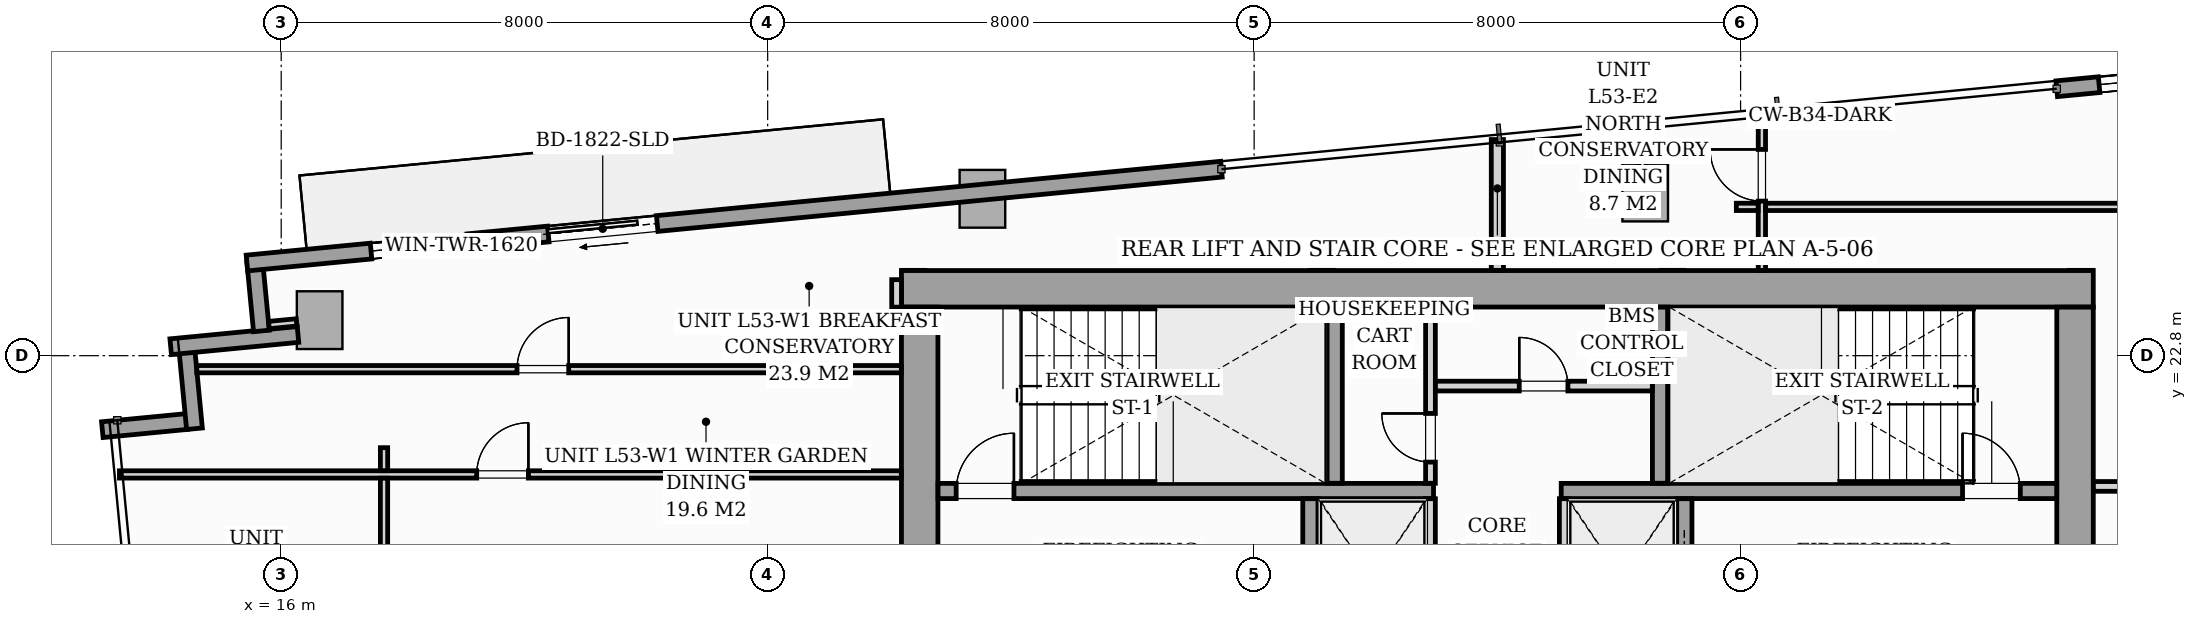
"""IFC4 building model, lengths in metres.
Left out: names, types, materials, properties, quantities, classifications, styles, units other than length and angle.
Written with IfcOpenShell. Run it as: python <this file> out.ifc"""

import sys

from ifc_helpers import new_model, si_unit, direction, frame, frame_2d, origin, origin_2d, place, context, subcontext, project, spatial, rectangle, i_section, extrude, source, transform, mapped, element, fill, save


model = new_model("IFC4")
c1 = context("Model", 3, precision=1e-05, world=origin(), true_north=direction((0.0, 1.0)))
c2 = subcontext(c1, "Body", "Model", "MODEL_VIEW")
j1 = project(units=[si_unit("LENGTHUNIT", "METRE"), si_unit("PLANEANGLEUNIT", "RADIAN")], contexts=[c1])
p1 = place(None, origin())
s1 = spatial("IfcSite", under=j1, at=p1, CompositionType="ELEMENT")
p2 = place(p1, origin())
s2 = spatial("IfcBuilding", under=s1, at=p2, CompositionType="ELEMENT")
p3 = place(p2, frame((0.0, 0.0, 185.8)))
s3 = spatial("IfcBuildingStorey", under=s2, at=p3, CompositionType="ELEMENT", Elevation=185.8)
m1 = source(origin(), c2, "Body", "SweptSolid", [
    extrude(i_section(OverallWidth=0.416, OverallDepth=0.446, WebThickness=0.039, FlangeThickness=0.063, FilletRadius=0.018, at=origin_2d()), origin(), (0.0, 0.0, 1.0), 3.196),
])
for number, where, z_axis, x_axis in (
    (1, (26.4, 24.0, 0.002), (0.0, 0.0, 1.0), (1.0, 0.0, 0.0)),
    (2, (33.12, 24.0, 0.002), (0.0, 0.0, 1.0), (1.0, 0.0, 0.0)),
    (3, (38.88, 24.0, 0.002), (0.0, 0.0, 1.0), (1.0, 0.0, 0.0)),
    (4, (45.6, 24.0, 0.002), (0.0, 0.0, 1.0), (1.0, 0.0, 0.0)),
):
    element("IfcColumn", number, at=place(p3, frame(where, z_axis=z_axis, x_axis=x_axis)), inside=s3, PredefinedType="PILASTER", context=c2, shape_type="MappedRepresentation", body=[
        mapped(m1, transform((0.0, 0.0, 0.0), scale=1.0)),
    ])
m2 = source(origin(), c2, "Body", "SweptSolid", [
    extrude(rectangle(XDim=0.75, YDim=0.95, at=origin_2d()), origin(), (0.0, 0.0, 1.0), 3.196),
])
for number, where, z_axis, x_axis in (
    (5, (16.632, 23.384, 0.002), (0.0, 0.0, 1.0), (0.995, 0.096, 0.0)),
    (6, (27.532, 25.38, 0.002), (0.0, 0.0, 1.0), (0.995, 0.096, 0.0)),
    (7, (38.431, 25.483, 0.002), (0.0, 0.0, 1.0), (0.995, 0.096, 0.0)),
):
    element("IfcColumn", number, at=place(p3, frame(where, z_axis=z_axis, x_axis=x_axis)), inside=s3, PredefinedType="COLUMN", context=c2, shape_type="MappedRepresentation", body=[
        mapped(m2, transform((0.0, 0.0, 0.0), scale=1.0)),
    ])
p4 = place(p3, frame((13.058, 21.583, 0.0), z_axis=(0.0, 0.0, 1.0), x_axis=(0.99540774648, 0.095725744959, 0.0)))
e8 = element("IfcWall", 8, at=p4, inside=s3, PredefinedType="STANDARD", context=c2, shape_type="SweptSolid", body=[
    extrude(rectangle(XDim=1.395, YDim=0.26, at=frame_2d((0.698, 0.0))), origin(), (0.0, 0.0, 1.0), 2.94),
])
p5 = place(p3, frame((14.574, 21.599, 0.0), z_axis=(0.0, 0.0, 1.0), x_axis=(-0.095742423056, 0.99540614245, 0.0)))
e9 = element("IfcWall", 9, at=p5, inside=s3, PredefinedType="STANDARD", context=c2, shape_type="SweptSolid", body=[
    extrude(rectangle(XDim=1.395, YDim=0.26, at=frame_2d((0.697, 0.0))), origin(), (0.0, 0.0, 1.0), 2.94),
])
p6 = place(p3, frame((14.183, 22.947, 0.0), z_axis=(0.0, 0.0, 1.0), x_axis=(0.995401580483, 0.095789840651, 0.0)))
e10 = element("IfcWall", 10, at=p6, inside=s3, PredefinedType="STANDARD", context=c2, shape_type="SweptSolid", body=[
    extrude(rectangle(XDim=2.103, YDim=0.26, at=frame_2d((1.051, 0.0))), origin(), (0.0, 0.0, 1.0), 2.94),
])
p7 = place(p3, frame((15.675, 23.207, 0.0), z_axis=(0.0, 0.0, 1.0), x_axis=(-0.095951054827, 0.995386053287, 0.0)))
e11 = element("IfcWall", 11, at=p7, inside=s3, PredefinedType="STANDARD", context=c2, shape_type="SweptSolid", body=[
    extrude(rectangle(XDim=1.15, YDim=0.26, at=frame_2d((0.575, 0.0))), origin(), (0.0, 0.0, 1.0), 2.94),
])
p8 = place(p3, frame((15.437, 24.324, 0.0), z_axis=(0.0, 0.0, 1.0), x_axis=(0.995395627913, 0.095851676732, 0.0)))
e12 = element("IfcWall", 12, at=p8, inside=s3, PredefinedType="STANDARD", context=c2, shape_type="SweptSolid", body=[
    extrude(rectangle(XDim=16.1, YDim=0.26, at=frame_2d((8.05, 0.0))), origin(), (0.0, 0.0, 1.0), 2.94),
])
p9 = place(p8, frame((4.978, 0.0, 0.0)))
e13 = element("IfcOpeningElement", 13, at=p9, cuts=e12, PredefinedType="OPENING", context=c2, shape_type="SweptSolid", body=[
    extrude(rectangle(XDim=1.8, YDim=2.06, at=frame_2d((0.9, 1.03))), frame((0.0, 0.14, 0.0), z_axis=(0.0, -1.0, 0.0), x_axis=(1.0, 0.0, 0.0)), (0.0, 0.0, 1.0), 0.28),
])
p10 = place(p8, frame((2.05, 0.0, 0.65)))
e14 = element("IfcOpeningElement", 14, at=p10, cuts=e12, PredefinedType="OPENING", context=c2, shape_type="SweptSolid", body=[
    extrude(rectangle(XDim=1.6, YDim=1.5, at=frame_2d((0.8, 0.75))), frame((0.0, 0.14, 0.0), z_axis=(0.0, -1.0, 0.0), x_axis=(1.0, 0.0, 0.0)), (0.0, 0.0, 1.0), 0.28),
])
p11 = place(p3, frame((45.199, 27.19, 0.0), z_axis=(0.0, 0.0, 1.0), x_axis=(0.995397074604, 0.095836652014, 0.0)))
e15 = element("IfcWall", 15, at=p11, inside=s3, PredefinedType="STANDARD", context=c2, shape_type="SweptSolid", body=[
    extrude(rectangle(XDim=16.1, YDim=0.26, at=frame_2d((8.05, 0.0))), origin(), (0.0, 0.0, 1.0), 2.94),
])
p12 = place(p11, frame((8.19, 0.0, 0.0)))
e16 = element("IfcOpeningElement", 16, at=p12, cuts=e15, PredefinedType="OPENING", context=c2, shape_type="SweptSolid", body=[
    extrude(rectangle(XDim=1.8, YDim=2.06, at=frame_2d((0.9, 1.03))), frame((0.0, 0.14, 0.0), z_axis=(0.0, -1.0, 0.0), x_axis=(1.0, 0.0, 0.0)), (0.0, 0.0, 1.0), 0.28),
])
p13 = place(p11, frame((0.7, 0.0, 0.65)))
e17 = element("IfcOpeningElement", 17, at=p13, cuts=e15, PredefinedType="OPENING", context=c2, shape_type="SweptSolid", body=[
    extrude(rectangle(XDim=1.6, YDim=1.5, at=frame_2d((0.8, 0.75))), frame((0.0, 0.14, 0.0), z_axis=(0.0, -1.0, 0.0), x_axis=(1.0, 0.0, 0.0)), (0.0, 0.0, 1.0), 0.28),
])
p14 = place(p3, frame((26.2, 23.9, 0.0), z_axis=(0.0, 0.0, 1.0), x_axis=(1.0, 0.0, 0.0)))
e18 = element("IfcWall", 18, at=p14, inside=s3, PredefinedType="SHEAR", context=c2, shape_type="SweptSolid", body=[
    extrude(rectangle(XDim=19.6, YDim=0.6, at=frame_2d((9.8, 0.0))), origin(), (0.0, 0.0, 1.0), 3.2),
])
for number, where, z_axis, x_axis in (
    (19, (26.5, 17.802, 0.0), (0.0, 0.0, 1.0), (0.0, 1.0, 0.0)),
    (20, (45.5, 17.802, 0.0), (0.0, 0.0, 1.0), (0.0, 1.0, 0.0)),
):
    element("IfcWall", number, at=place(p3, frame(where, z_axis=z_axis, x_axis=x_axis)), inside=s3, PredefinedType="SHEAR", context=c2, shape_type="SweptSolid", body=[
        extrude(rectangle(XDim=5.796, YDim=0.6, at=frame_2d((2.898, 0.0))), origin(), (0.0, 0.0, 1.0), 3.2),
    ])
p15 = place(p3, frame((26.802, 20.575, 0.0), z_axis=(0.0, 0.0, 1.0), x_axis=(1.0, 0.0, 0.0)))
e21 = element("IfcWall", 21, at=p15, inside=s3, PredefinedType="SOLIDWALL", context=c2, shape_type="SweptSolid", body=[
    extrude(rectangle(XDim=8.148, YDim=0.25, at=frame_2d((4.074, 0.0))), origin(), (0.0, 0.0, 1.0), 3.2),
])
p16 = place(p15, frame((0.298, 0.0, 0.0)))
e22 = element("IfcOpeningElement", 22, at=p16, cuts=e21, PredefinedType="OPENING", context=c2, shape_type="SweptSolid", body=[
    extrude(rectangle(XDim=0.95, YDim=2.06, at=frame_2d((0.475, 1.03))), frame((0.0, 0.135, 0.0), z_axis=(0.0, -1.0, 0.0), x_axis=(1.0, 0.0, 0.0)), (0.0, 0.0, 1.0), 0.27),
])
p17 = place(p3, frame((37.05, 20.575, 0.0), z_axis=(0.0, 0.0, 1.0), x_axis=(1.0, 0.0, 0.0)))
e23 = element("IfcWall", 23, at=p17, inside=s3, PredefinedType="SOLIDWALL", context=c2, shape_type="SweptSolid", body=[
    extrude(rectangle(XDim=8.148, YDim=0.25, at=frame_2d((4.074, 0.0))), origin(), (0.0, 0.0, 1.0), 3.2),
])
p18 = place(p17, frame((6.6, 0.0, 0.0)))
e24 = element("IfcOpeningElement", 24, at=p18, cuts=e23, PredefinedType="OPENING", context=c2, shape_type="SweptSolid", body=[
    extrude(rectangle(XDim=0.95, YDim=2.06, at=frame_2d((0.475, 1.03))), frame((0.0, 0.135, 0.0), z_axis=(0.0, -1.0, 0.0), x_axis=(1.0, 0.0, 0.0)), (0.0, 0.0, 1.0), 0.27),
])
for number, where, z_axis, x_axis in (
    (25, (33.325, 20.702, 0.0), (0.0, 0.0, 1.0), (0.0, 1.0, 0.0)),
    (26, (38.675, 20.702, 0.0), (0.0, 0.0, 1.0), (0.0, 1.0, 0.0)),
):
    element("IfcWall", number, at=place(p3, frame(where, z_axis=z_axis, x_axis=x_axis)), inside=s3, PredefinedType="SOLIDWALL", context=c2, shape_type="SweptSolid", body=[
        extrude(rectangle(XDim=2.896, YDim=0.25, at=frame_2d((1.448, 0.0))), origin(), (0.0, 0.0, 1.0), 3.2),
    ])
p19 = place(p3, frame((32.925, 17.802, 0.0), z_axis=(0.0, 0.0, 1.0), x_axis=(0.0, 1.0, 0.0)))
e27 = element("IfcWall", 27, at=p19, inside=s3, PredefinedType="SOLIDWALL", context=c2, shape_type="SweptSolid", body=[
    extrude(rectangle(XDim=2.646, YDim=0.25, at=frame_2d((1.323, 0.0))), origin(), (0.0, 0.0, 1.0), 3.2),
])
p20 = place(p19, frame((0.548, 0.0, 0.0)))
e28 = element("IfcOpeningElement", 28, at=p20, cuts=e27, PredefinedType="OPENING", context=c2, shape_type="SweptSolid", body=[
    extrude(rectangle(XDim=1.1, YDim=2.08, at=frame_2d((0.55, 1.04))), frame((0.0, 0.135, 0.0), z_axis=(0.0, -1.0, 0.0), x_axis=(1.0, 0.0, 0.0)), (0.0, 0.0, 1.0), 0.27),
])
for number, where, z_axis, x_axis in (
    (29, (34.9, 17.802, 0.0), (0.0, 0.0, 1.0), (0.0, 1.0, 0.0)),
    (30, (37.1, 17.802, 0.0), (0.0, 0.0, 1.0), (0.0, 1.0, 0.0)),
):
    element("IfcWall", number, at=place(p3, frame(where, z_axis=z_axis, x_axis=x_axis)), inside=s3, PredefinedType="PARTITIONING", context=c2, shape_type="SweptSolid", body=[
        extrude(rectangle(XDim=2.646, YDim=0.16, at=frame_2d((1.323, 0.0))), origin(), (0.0, 0.0, 1.0), 2.94),
    ])
p21 = place(p3, frame((39.075, 17.802, 0.0), z_axis=(0.0, 0.0, 1.0), x_axis=(0.0, 1.0, 0.0)))
e31 = element("IfcWall", 31, at=p21, inside=s3, PredefinedType="SOLIDWALL", context=c2, shape_type="SweptSolid", body=[
    extrude(rectangle(XDim=2.646, YDim=0.25, at=frame_2d((1.323, 0.0))), origin(), (0.0, 0.0, 1.0), 3.2),
])
p22 = place(p21, frame((0.548, 0.0, 0.0)))
e32 = element("IfcOpeningElement", 32, at=p22, cuts=e31, PredefinedType="OPENING", context=c2, shape_type="SweptSolid", body=[
    extrude(rectangle(XDim=1.1, YDim=2.08, at=frame_2d((0.55, 1.04))), frame((0.0, 0.135, 0.0), z_axis=(0.0, -1.0, 0.0), x_axis=(1.0, 0.0, 0.0)), (0.0, 0.0, 1.0), 0.27),
])
p23 = place(p3, frame((34.9, 20.702, 0.0), z_axis=(0.0, 0.0, 1.0), x_axis=(0.0, 1.0, 0.0)))
e33 = element("IfcWall", 33, at=p23, inside=s3, PredefinedType="PARTITIONING", context=c2, shape_type="SweptSolid", body=[
    extrude(rectangle(XDim=2.896, YDim=0.16, at=frame_2d((1.448, 0.0))), origin(), (0.0, 0.0, 1.0), 2.94),
])
p24 = place(p23, frame((0.348, 0.0, 0.0)))
e34 = element("IfcOpeningElement", 34, at=p24, cuts=e33, PredefinedType="OPENING", context=c2, shape_type="SweptSolid", body=[
    extrude(rectangle(XDim=0.8, YDim=2.05, at=frame_2d((0.4, 1.025))), frame((0.0, 0.09, 0.0), z_axis=(0.0, -1.0, 0.0), x_axis=(1.0, 0.0, 0.0)), (0.0, 0.0, 1.0), 0.18),
])
p25 = place(p3, frame((34.982, 22.3, 0.0), z_axis=(0.0, 0.0, 1.0), x_axis=(1.0, 0.0, 0.0)))
e35 = element("IfcWall", 35, at=p25, inside=s3, PredefinedType="PARTITIONING", context=c2, shape_type="SweptSolid", body=[
    extrude(rectangle(XDim=3.566, YDim=0.16, at=frame_2d((1.783, 0.0))), origin(), (0.0, 0.0, 1.0), 2.94),
])
p26 = place(p25, frame((1.378, 0.0, 0.0)))
e36 = element("IfcOpeningElement", 36, at=p26, cuts=e35, PredefinedType="OPENING", context=c2, shape_type="SweptSolid", body=[
    extrude(rectangle(XDim=0.8, YDim=2.05, at=frame_2d((0.4, 1.025))), frame((0.0, 0.09, 0.0), z_axis=(0.0, -1.0, 0.0), x_axis=(1.0, 0.0, 0.0)), (0.0, 0.0, 1.0), 0.18),
])
p27 = place(p3, frame((26.12, 23.598, 0.0), z_axis=(0.0, 0.0, 1.0), x_axis=(0.0, 1.0, 0.0)))
e37 = element("IfcWall", 37, at=p27, inside=s3, PredefinedType="PARTITIONING", context=c2, shape_type="SweptSolid", body=[
    extrude(rectangle(XDim=0.452, YDim=0.16, at=frame_2d((0.226, 0.0))), origin(), (0.0, 0.0, 1.0), 2.94),
])
p28 = place(p3, frame((36.0, 24.202, 0.0), z_axis=(0.0, 0.0, 1.0), x_axis=(0.0, 1.0, 0.0)))
e38 = element("IfcWall", 38, at=p28, inside=s3, PredefinedType="PARTITIONING", context=c2, shape_type="SweptSolid", body=[
    extrude(rectangle(XDim=2.152, YDim=0.2, at=frame_2d((1.076, 0.0))), origin(), (0.0, 0.0, 1.0), 2.94),
])
p29 = place(p3, frame((45.802, 20.65, 0.0), z_axis=(0.0, 0.0, 1.0), x_axis=(1.0, 0.0, 0.0)))
e39 = element("IfcWall", 39, at=p29, inside=s3, PredefinedType="PARTITIONING", context=c2, shape_type="SweptSolid", body=[
    extrude(rectangle(XDim=1.566, YDim=0.16, at=frame_2d((0.783, 0.0))), origin(), (0.0, 0.0, 1.0), 2.94),
])
p30 = place(p3, frame((14.612, 22.578, 0.0), z_axis=(0.0, 0.0, 1.0), x_axis=(1.0, 0.0, 0.0)))
e40 = element("IfcWall", 40, at=p30, inside=s3, PredefinedType="PARTITIONING", context=c2, shape_type="SweptSolid", body=[
    extrude(rectangle(XDim=11.586, YDim=0.12, at=frame_2d((5.793, 0.0))), origin(), (0.0, 0.0, 1.0), 2.94),
])
p31 = place(p30, frame((5.266, 0.0, 0.0)))
e41 = element("IfcOpeningElement", 41, at=p31, cuts=e40, PredefinedType="OPENING", context=c2, shape_type="SweptSolid", body=[
    extrude(rectangle(XDim=0.85, YDim=2.05, at=frame_2d((0.425, 1.025))), frame((0.0, 0.07, 0.0), z_axis=(0.0, -1.0, 0.0), x_axis=(1.0, 0.0, 0.0)), (0.0, 0.0, 1.0), 0.14),
])
p32 = place(p3, frame((13.34, 20.847, 0.0), z_axis=(0.0, 0.0, 1.0), x_axis=(1.0, 0.0, 0.0)))
e42 = element("IfcWall", 42, at=p32, inside=s3, PredefinedType="PARTITIONING", context=c2, shape_type="SweptSolid", body=[
    extrude(rectangle(XDim=12.858, YDim=0.12, at=frame_2d((6.429, 0.0))), origin(), (0.0, 0.0, 1.0), 2.94),
])
p33 = place(p32, frame((5.875, 0.0, 0.0)))
e43 = element("IfcOpeningElement", 43, at=p33, cuts=e42, PredefinedType="OPENING", context=c2, shape_type="SweptSolid", body=[
    extrude(rectangle(XDim=0.85, YDim=2.05, at=frame_2d((0.425, 1.025))), frame((0.0, 0.07, 0.0), z_axis=(0.0, -1.0, 0.0), x_axis=(1.0, 0.0, 0.0)), (0.0, 0.0, 1.0), 0.14),
])
p34 = place(p3, frame((17.691, 12.096, 0.0), z_axis=(0.0, 0.0, 1.0), x_axis=(0.0, 1.0, 0.0)))
e44 = element("IfcWall", 44, at=p34, inside=s3, PredefinedType="PARTITIONING", context=c2, shape_type="SweptSolid", body=[
    extrude(rectangle(XDim=8.689, YDim=0.12, at=frame_2d((4.344, 0.0))), origin(), (0.0, 0.0, 1.0), 2.94),
])
p35 = place(p34, frame((3.92, 0.0, 0.0)))
e45 = element("IfcOpeningElement", 45, at=p35, cuts=e44, PredefinedType="OPENING", context=c2, shape_type="SweptSolid", body=[
    extrude(rectangle(XDim=0.85, YDim=2.05, at=frame_2d((0.425, 1.025))), frame((0.0, 0.07, 0.0), z_axis=(0.0, -1.0, 0.0), x_axis=(1.0, 0.0, 0.0)), (0.0, 0.0, 1.0), 0.14),
])
p36 = place(p3, frame((17.691, 20.909, 0.0), z_axis=(0.0, 0.0, 1.0), x_axis=(0.0, 1.0, 0.0)))
e46 = element("IfcWall", 46, at=p36, inside=s3, PredefinedType="PARTITIONING", context=c2, shape_type="SweptSolid", body=[
    extrude(rectangle(XDim=0.378, YDim=0.12, at=frame_2d((0.189, 0.0))), origin(), (0.0, 0.0, 1.0), 2.94),
])
p37 = place(p3, frame((40.35, 24.202, 0.0), z_axis=(0.0, 0.0, 1.0), x_axis=(0.0, 1.0, 0.0)))
e47 = element("IfcWall", 47, at=p37, inside=s3, PredefinedType="PARTITIONING", context=c2, shape_type="SweptSolid", body=[
    extrude(rectangle(XDim=2.571, YDim=0.12, at=frame_2d((1.286, 0.0))), origin(), (0.0, 0.0, 1.0), 2.94),
])
p38 = place(p37, frame((1.14, 0.0, 0.0)))
e48 = element("IfcOpeningElement", 48, at=p38, cuts=e47, PredefinedType="OPENING", context=c2, shape_type="SweptSolid", body=[
    extrude(rectangle(XDim=0.85, YDim=2.05, at=frame_2d((0.425, 1.025))), frame((0.0, 0.07, 0.0), z_axis=(0.0, -1.0, 0.0), x_axis=(1.0, 0.0, 0.0)), (0.0, 0.0, 1.0), 0.14),
])
p39 = place(p3, frame((39.93, 25.247, 0.0), z_axis=(0.0, 0.0, 1.0), x_axis=(1.0, 0.0, 0.0)))
e49 = element("IfcWall", 49, at=p39, inside=s3, PredefinedType="PARTITIONING", context=c2, shape_type="SweptSolid", body=[
    extrude(rectangle(XDim=0.358, YDim=0.12, at=frame_2d((0.179, 0.0))), origin(), (0.0, 0.0, 1.0), 2.94),
])
p40 = place(p3, frame((40.412, 25.247, 0.0), z_axis=(0.0, 0.0, 1.0), x_axis=(1.0, 0.0, 0.0)))
e50 = element("IfcWall", 50, at=p40, inside=s3, PredefinedType="PARTITIONING", context=c2, shape_type="SweptSolid", body=[
    extrude(rectangle(XDim=11.744, YDim=0.12, at=frame_2d((5.872, 0.0))), origin(), (0.0, 0.0, 1.0), 2.94),
])
p41 = place(p40, frame((6.1, 0.0, 0.0)))
e51 = element("IfcOpeningElement", 51, at=p41, cuts=e50, PredefinedType="OPENING", context=c2, shape_type="SweptSolid", body=[
    extrude(rectangle(XDim=0.85, YDim=2.05, at=frame_2d((0.425, 1.025))), frame((0.0, 0.07, 0.0), z_axis=(0.0, -1.0, 0.0), x_axis=(1.0, 0.0, 0.0)), (0.0, 0.0, 1.0), 0.14),
])
p42 = place(p3, frame((16.254, 23.348, 0.0), z_axis=(0.0, 0.0, 1.0), x_axis=(-0.995389482415, -0.095915474751, 0.0)))
e52 = element("IfcWall", 52, at=p42, inside=s3, PredefinedType="PARTITIONING", context=c2, shape_type="SweptSolid", body=[
    extrude(rectangle(XDim=0.458, YDim=0.12, at=frame_2d((0.229, 0.0))), origin(), (0.0, 0.0, 1.0), 2.94),
])
p43 = place(p3, frame((38.395, 25.861, 0.0), z_axis=(0.0, 0.0, 1.0), x_axis=(-0.095977354523, 0.995383517755, 0.0)))
e53 = element("IfcWall", 53, at=p43, inside=s3, PredefinedType="PARTITIONING", context=c2, shape_type="SweptSolid", body=[
    extrude(rectangle(XDim=0.72, YDim=0.12, at=frame_2d((0.36, 0.0))), origin(), (0.0, 0.0, 1.0), 2.94),
])
m3 = source(origin(), c2, "Body", "SweptSolid", [
    extrude(rectangle(XDim=1.8, YDim=2.06, at=frame_2d((0.9, 1.03))), frame((0.0, 0.025, 0.0), z_axis=(0.0, -1.0, 0.0), x_axis=(1.0, 0.0, 0.0)), (0.0, 0.0, 1.0), 0.05),
])
p44 = place(p9, origin())
e54 = element("IfcDoor", 54, at=p44, inside=s3, OperationType="SLIDING_TO_LEFT", PredefinedType="DOOR", context=c2, shape_type="MappedRepresentation", body=[
    mapped(m3, transform((0.0, 0.0, 0.0), scale=1.0)),
])
fill(e13, e54)
m4 = source(origin(), c2, "Body", "SweptSolid", [
    extrude(rectangle(XDim=1.6, YDim=1.5, at=frame_2d((0.8, 0.75))), frame((0.0, 0.03, 0.0), z_axis=(0.0, -1.0, 0.0), x_axis=(1.0, 0.0, 0.0)), (0.0, 0.0, 1.0), 0.06),
])
p45 = place(p10, origin())
e55 = element("IfcWindow", 55, at=p45, inside=s3, PartitioningType="SINGLE_PANEL", PredefinedType="WINDOW", context=c2, shape_type="MappedRepresentation", body=[
    mapped(m4, transform((0.0, 0.0, 0.0), scale=1.0)),
])
fill(e14, e55)
p46 = place(p13, origin())
e56 = element("IfcWindow", 56, at=p46, inside=s3, PartitioningType="SINGLE_PANEL", PredefinedType="WINDOW", context=c2, shape_type="MappedRepresentation", body=[
    mapped(m4, transform((0.0, 0.0, 0.0), scale=1.0)),
])
fill(e17, e56)
m5 = source(origin(), c2, "Body", "SweptSolid", [
    extrude(rectangle(XDim=0.95, YDim=2.06, at=frame_2d((0.475, 1.03))), frame((0.0, 0.025, 0.0), z_axis=(0.0, -1.0, 0.0), x_axis=(1.0, 0.0, 0.0)), (0.0, 0.0, 1.0), 0.05),
])
p47 = place(p16, origin())
e57 = element("IfcDoor", 57, at=p47, inside=s3, OperationType="SINGLE_SWING_RIGHT", PredefinedType="DOOR", context=c2, shape_type="MappedRepresentation", body=[
    mapped(m5, transform((0.0, 0.0, 0.0), scale=1.0)),
])
fill(e22, e57)
p48 = place(p18, origin())
e58 = element("IfcDoor", 58, at=p48, inside=s3, OperationType="SINGLE_SWING_LEFT", PredefinedType="DOOR", context=c2, shape_type="MappedRepresentation", body=[
    mapped(m5, transform((0.0, 0.0, 0.0), scale=1.0)),
])
fill(e24, e58)
m6 = source(origin(), c2, "Body", "SweptSolid", [
    extrude(rectangle(XDim=0.8, YDim=2.05, at=frame_2d((0.4, 1.025))), frame((0.0, 0.025, 0.0), z_axis=(0.0, -1.0, 0.0), x_axis=(1.0, 0.0, 0.0)), (0.0, 0.0, 1.0), 0.05),
])
p49 = place(p24, origin())
e59 = element("IfcDoor", 59, at=p49, inside=s3, OperationType="SINGLE_SWING_RIGHT", PredefinedType="DOOR", context=c2, shape_type="MappedRepresentation", body=[
    mapped(m6, transform((0.0, 0.0, 0.0), scale=1.0)),
])
fill(e34, e59)
p50 = place(p26, origin())
e60 = element("IfcDoor", 60, at=p50, inside=s3, OperationType="SINGLE_SWING_LEFT", PredefinedType="DOOR", context=c2, shape_type="MappedRepresentation", body=[
    mapped(m6, transform((0.0, 0.0, 0.0), scale=1.0)),
])
fill(e36, e60)
m7 = source(origin(), c2, "Body", "SweptSolid", [
    extrude(rectangle(XDim=0.85, YDim=2.05, at=frame_2d((0.425, 1.025))), frame((0.0, 0.025, 0.0), z_axis=(0.0, -1.0, 0.0), x_axis=(1.0, 0.0, 0.0)), (0.0, 0.0, 1.0), 0.05),
])
p51 = place(p31, origin())
e61 = element("IfcDoor", 61, at=p51, inside=s3, OperationType="SINGLE_SWING_RIGHT", PredefinedType="DOOR", context=c2, shape_type="MappedRepresentation", body=[
    mapped(m7, transform((0.0, 0.0, 0.0), scale=1.0)),
])
fill(e41, e61)
p52 = place(p33, origin())
e62 = element("IfcDoor", 62, at=p52, inside=s3, OperationType="SINGLE_SWING_RIGHT", PredefinedType="DOOR", context=c2, shape_type="MappedRepresentation", body=[
    mapped(m7, transform((0.0, 0.0, 0.0), scale=1.0)),
])
fill(e43, e62)
p53 = place(p38, origin())
e63 = element("IfcDoor", 63, at=p53, inside=s3, OperationType="SINGLE_SWING_RIGHT", PredefinedType="DOOR", context=c2, shape_type="MappedRepresentation", body=[
    mapped(m7, transform((0.0, 0.0, 0.0), scale=1.0)),
])
fill(e48, e63)
save(model, sys.argv[1])
